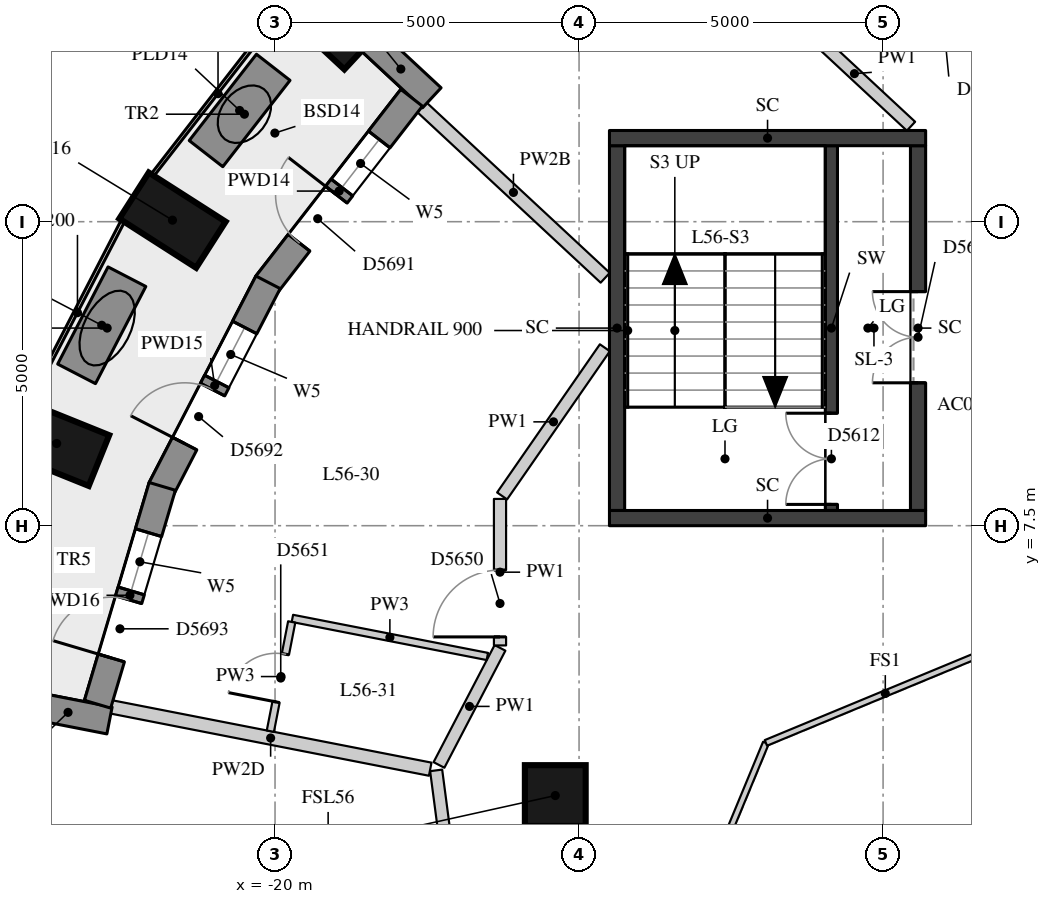
"""IFC4 building model, lengths in metres.
Left out: names, types, materials, properties, quantities, classifications, styles, units other than length and angle.
Written with IfcOpenShell. Run it as: python <this file> out.ifc"""

import sys

from ifc_helpers import new_model, si_unit, direction, frame, frame_2d, origin, origin_2d, place, context, subcontext, project, spatial, rectangle, extrude, element, fill, save


model = new_model("IFC4")
c1 = context("Model", 3, precision=1e-05, world=origin(), true_north=direction((0.0, 1.0)))
c2 = subcontext(c1, "Body", "Model", "MODEL_VIEW")
j1 = project(units=[si_unit("LENGTHUNIT", "METRE"), si_unit("PLANEANGLEUNIT", "RADIAN")], contexts=[c1])
p1 = place(None, origin())
s1 = spatial("IfcSite", under=j1, at=p1, CompositionType="ELEMENT")
p2 = place(p1, origin())
s2 = spatial("IfcBuilding", under=s1, at=p2, CompositionType="ELEMENT")
p3 = place(p2, frame((0.0, 0.0, 199.1)))
s3 = spatial("IfcBuildingStorey", under=s2, at=p3, CompositionType="ELEMENT", Elevation=199.1)
for number, where, z_axis, x_axis in (
    (1, (-19.102, 15.845, 0.0), (0.0, 0.0, 1.0), (-0.732, 0.681, 0.0)),
    (2, (-21.687, 12.525, 0.0), (0.0, 0.0, 1.0), (-0.842, 0.539, 0.0)),
    (3, (-23.591, 8.852, 0.0), (0.0, 0.0, 1.0), (-0.927, 0.374, 0.0)),
):
    element("IfcColumn", number, at=place(p3, frame(where, z_axis=z_axis, x_axis=x_axis)), inside=s3, PredefinedType="COLUMN", context=c2, shape_type="SweptSolid", body=[
        extrude(rectangle(XDim=1.5, YDim=0.9, at=origin_2d()), origin(), (0.0, 0.0, 1.0), 3.3),
    ])
p4 = place(p3, frame((-15.391, 3.062, 0.0), z_axis=(0.0, 0.0, 1.0), x_axis=(1.0, 0.0, 0.0)))
e4 = element("IfcColumn", 4, at=p4, inside=s3, PredefinedType="COLUMN", context=c2, shape_type="SweptSolid", body=[
    extrude(rectangle(XDim=1.0, YDim=1.0, at=origin_2d()), origin(), (0.0, 0.0, 1.0), 3.3),
])
p5 = place(p3, frame((-18.44, 15.484, 0.0), z_axis=(0.0, 0.0, 1.0), x_axis=(0.732268156969, -0.681016406769, 0.0)))
e5 = element("IfcWall", 5, at=p5, inside=s3, PredefinedType="SOLIDWALL", context=c2, shape_type="SweptSolid", body=[
    extrude(rectangle(XDim=1.391, YDim=0.45, at=frame_2d((0.695, 0.0))), origin(), (0.0, 0.0, 1.0), 2.57),
])
p6 = place(p3, frame((-24.087, 4.563, 0.0), z_axis=(0.0, 0.0, 1.0), x_axis=(0.98143579878, -0.191790961394, 0.0)))
e6 = element("IfcWall", 6, at=p6, inside=s3, PredefinedType="SOLIDWALL", context=c2, shape_type="SweptSolid", body=[
    extrude(rectangle(XDim=1.39, YDim=0.45, at=frame_2d((0.695, 0.0))), origin(), (0.0, 0.0, 1.0), 2.47),
])
p7 = place(p3, frame((-17.754, 14.539, 0.0), z_axis=(0.0, 0.0, 1.0), x_axis=(-0.613174901215, -0.789947175779, 0.0)))
e7 = element("IfcWall", 7, at=p7, inside=s3, PredefinedType="SOLIDWALL", context=c2, shape_type="SweptSolid", body=[
    extrude(rectangle(XDim=3.886, YDim=0.45, at=frame_2d((1.943, 0.0))), origin(), (0.0, 0.0, 1.0), 3.02),
])
p8 = place(p7, frame((0.868, 0.0, 0.4)))
e8 = element("IfcOpeningElement", 8, at=p8, cuts=e7, PredefinedType="OPENING", context=c2, shape_type="SweptSolid", body=[
    extrude(rectangle(XDim=1.0, YDim=1.75, at=frame_2d((0.5, 0.875))), frame((0.0, 0.235, 0.0), z_axis=(0.0, -1.0, 0.0), x_axis=(1.0, 0.0, 0.0)), (0.0, 0.0, 1.0), 0.47),
])
p9 = place(p7, frame((2.018, 0.0, 0.0)))
e9 = element("IfcOpeningElement", 9, at=p9, cuts=e7, PredefinedType="OPENING", context=c2, shape_type="SweptSolid", body=[
    extrude(rectangle(XDim=1.0, YDim=2.15, at=frame_2d((0.5, 1.075))), frame((0.0, 0.235, 0.0), z_axis=(0.0, -1.0, 0.0), x_axis=(1.0, 0.0, 0.0)), (0.0, 0.0, 1.0), 0.47),
])
p10 = place(p3, frame((-20.115, 11.503, 0.0), z_axis=(0.0, 0.0, 1.0), x_axis=(-0.459205720451, -0.888329953511, 0.0)))
e10 = element("IfcWall", 10, at=p10, inside=s3, PredefinedType="SOLIDWALL", context=c2, shape_type="SweptSolid", body=[
    extrude(rectangle(XDim=3.823, YDim=0.45, at=frame_2d((1.911, 0.0))), origin(), (0.0, 0.0, 1.0), 3.02),
])
p11 = place(p10, frame((0.836, 0.0, 0.4)))
e11 = element("IfcOpeningElement", 11, at=p11, cuts=e10, PredefinedType="OPENING", context=c2, shape_type="SweptSolid", body=[
    extrude(rectangle(XDim=1.0, YDim=1.75, at=frame_2d((0.5, 0.875))), frame((0.0, 0.235, 0.0), z_axis=(0.0, -1.0, 0.0), x_axis=(1.0, 0.0, 0.0)), (0.0, 0.0, 1.0), 0.47),
])
p12 = place(p10, frame((1.986, 0.0, 0.0)))
e12 = element("IfcOpeningElement", 12, at=p12, cuts=e10, PredefinedType="OPENING", context=c2, shape_type="SweptSolid", body=[
    extrude(rectangle(XDim=1.0, YDim=2.15, at=frame_2d((0.5, 1.075))), frame((0.0, 0.235, 0.0), z_axis=(0.0, -1.0, 0.0), x_axis=(1.0, 0.0, 0.0)), (0.0, 0.0, 1.0), 0.47),
])
p13 = place(p3, frame((-21.854, 8.146, 0.0), z_axis=(0.0, 0.0, 1.0), x_axis=(-0.284757753004, -0.958599510799, 0.0)))
e13 = element("IfcWall", 13, at=p13, inside=s3, PredefinedType="SOLIDWALL", context=c2, shape_type="SweptSolid", body=[
    extrude(rectangle(XDim=3.737, YDim=0.45, at=frame_2d((1.869, 0.0))), origin(), (0.0, 0.0, 1.0), 3.02),
])
p14 = place(p13, frame((0.794, 0.0, 0.4)))
e14 = element("IfcOpeningElement", 14, at=p14, cuts=e13, PredefinedType="OPENING", context=c2, shape_type="SweptSolid", body=[
    extrude(rectangle(XDim=1.0, YDim=1.75, at=frame_2d((0.5, 0.875))), frame((0.0, 0.235, 0.0), z_axis=(0.0, -1.0, 0.0), x_axis=(1.0, 0.0, 0.0)), (0.0, 0.0, 1.0), 0.47),
])
p15 = place(p13, frame((1.944, 0.0, 0.0)))
e15 = element("IfcOpeningElement", 15, at=p15, cuts=e13, PredefinedType="OPENING", context=c2, shape_type="SweptSolid", body=[
    extrude(rectangle(XDim=1.0, YDim=2.15, at=frame_2d((0.5, 1.075))), frame((0.0, 0.235, 0.0), z_axis=(0.0, -1.0, 0.0), x_axis=(1.0, 0.0, 0.0)), (0.0, 0.0, 1.0), 0.47),
])
for number, where, z_axis, x_axis in (
    (16, (-20.03, 15.04, 0.0), (0.0, 0.0, 1.0), (-0.614, -0.789, 0.0)),
    (17, (-22.436, 11.595, 0.0), (0.0, 0.0, 1.0), (-0.46, -0.888, 0.0)),
):
    element("IfcWall", number, at=place(p3, frame(where, z_axis=z_axis, x_axis=x_axis)), inside=s3, PredefinedType="USERDEFINED", context=c2, shape_type="SweptSolid", body=[
        extrude(rectangle(XDim=1.8, YDim=0.7, at=frame_2d((0.9, 0.0))), origin(), (0.0, 0.0, 1.0), 0.75),
    ])
p16 = place(p3, frame((-10.85, 7.75, 0.0), z_axis=(0.0, 0.0, 1.0), x_axis=(0.0, 1.0, 0.0)))
e18 = element("IfcWall", 18, at=p16, inside=s3, PredefinedType="SHEAR", context=c2, shape_type="SweptSolid", body=[
    extrude(rectangle(XDim=6.0, YDim=0.2, at=frame_2d((3.0, 0.0))), origin(), (0.0, 0.0, 1.0), 3.02),
])
p17 = place(p16, frame((0.1, 0.0, 0.0)))
e19 = element("IfcOpeningElement", 19, at=p17, cuts=e18, PredefinedType="OPENING", context=c2, shape_type="SweptSolid", body=[
    extrude(rectangle(XDim=1.5, YDim=2.1, at=frame_2d((0.75, 1.05))), frame((0.0, 0.11, 0.0), z_axis=(0.0, -1.0, 0.0), x_axis=(1.0, 0.0, 0.0)), (0.0, 0.0, 1.0), 0.22),
])
p18 = place(p3, frame((-14.375, 7.75, -0.28), z_axis=(0.0, 0.0, 1.0), x_axis=(0.0, 1.0, 0.0)))
e20 = element("IfcWall", 20, at=p18, inside=s3, PredefinedType="SHEAR", context=c2, shape_type="SweptSolid", body=[
    extrude(rectangle(XDim=6.0, YDim=0.25, at=frame_2d((3.0, 0.0))), origin(), (0.0, 0.0, 1.0), 3.3),
])
p19 = place(p3, frame((-9.425, 7.75, -0.28), z_axis=(0.0, 0.0, 1.0), x_axis=(0.0, 1.0, 0.0)))
e21 = element("IfcWall", 21, at=p19, inside=s3, PredefinedType="SHEAR", context=c2, shape_type="SweptSolid", body=[
    extrude(rectangle(XDim=6.0, YDim=0.25, at=frame_2d((3.0, 0.0))), origin(), (0.0, 0.0, 1.0), 3.3),
])
p20 = place(p19, frame((2.1, 0.0, 0.28)))
e22 = element("IfcOpeningElement", 22, at=p20, cuts=e21, PredefinedType="OPENING", context=c2, shape_type="SweptSolid", body=[
    extrude(rectangle(XDim=1.5, YDim=2.1, at=frame_2d((0.75, 1.05))), frame((0.0, 0.135, 0.0), z_axis=(0.0, -1.0, 0.0), x_axis=(1.0, 0.0, 0.0)), (0.0, 0.0, 1.0), 0.27),
])
for number, where, z_axis, x_axis in (
    (23, (-14.5, 13.875, -0.28), (0.0, 0.0, 1.0), (1.0, 0.0, 0.0)),
    (24, (-14.5, 7.625, -0.28), (0.0, 0.0, 1.0), (1.0, 0.0, 0.0)),
):
    element("IfcWall", number, at=place(p3, frame(where, z_axis=z_axis, x_axis=x_axis)), inside=s3, PredefinedType="SHEAR", context=c2, shape_type="SweptSolid", body=[
        extrude(rectangle(XDim=5.2, YDim=0.25, at=frame_2d((2.6, 0.0))), origin(), (0.0, 0.0, 1.0), 3.3),
    ])
p21 = place(p3, frame((-16.303, -4.501, 0.0), z_axis=(0.0, 0.0, 1.0), x_axis=(-0.130191522351, 0.991488864036, 0.0)))
e25 = element("IfcWall", 25, at=p21, inside=s3, PredefinedType="PARTITIONING", context=c2, shape_type="SweptSolid", body=[
    extrude(rectangle(XDim=8.045, YDim=0.2, at=frame_2d((4.022, 0.0))), origin(), (0.0, 0.0, 1.0), 3.02),
])
p22 = place(p21, frame((2.738, 0.0, 0.0)))
e26 = element("IfcOpeningElement", 26, at=p22, cuts=e25, PredefinedType="OPENING", context=c2, shape_type="SweptSolid", body=[
    extrude(rectangle(XDim=0.9, YDim=2.1, at=frame_2d((0.45, 1.05))), frame((0.0, 0.11, 0.0), z_axis=(0.0, -1.0, 0.0), x_axis=(1.0, 0.0, 0.0)), (0.0, 0.0, 1.0), 0.22),
])
p23 = place(p3, frame((-17.304, 3.565, 0.0), z_axis=(0.0, 0.0, 1.0), x_axis=(0.46212415324, 0.886815238363, 0.0)))
e27 = element("IfcWall", 27, at=p23, inside=s3, PredefinedType="PARTITIONING", context=c2, shape_type="SweptSolid", body=[
    extrude(rectangle(XDim=2.172, YDim=0.2, at=frame_2d((1.086, 0.0))), origin(), (0.0, 0.0, 1.0), 3.02),
])
p24 = place(p3, frame((-16.3, 5.531, 0.0), z_axis=(0.0, 0.0, 1.0), x_axis=(0.0, 1.0, 0.0)))
e28 = element("IfcWall", 28, at=p24, inside=s3, PredefinedType="PARTITIONING", context=c2, shape_type="SweptSolid", body=[
    extrude(rectangle(XDim=2.409, YDim=0.2, at=frame_2d((1.205, 0.0))), origin(), (0.0, 0.0, 1.0), 3.02),
])
p25 = place(p24, frame((0.14, 0.0, 0.0)))
e29 = element("IfcOpeningElement", 29, at=p25, cuts=e28, PredefinedType="OPENING", context=c2, shape_type="SweptSolid", body=[
    extrude(rectangle(XDim=1.1, YDim=2.1, at=frame_2d((0.55, 1.05))), frame((0.0, 0.11, 0.0), z_axis=(0.0, -1.0, 0.0), x_axis=(1.0, 0.0, 0.0)), (0.0, 0.0, 1.0), 0.22),
])
p26 = place(p3, frame((-16.266, 7.989, 0.0), z_axis=(0.0, 0.0, 1.0), x_axis=(0.569860411146, 0.821741511552, 0.0)))
e30 = element("IfcWall", 30, at=p26, inside=s3, PredefinedType="PARTITIONING", context=c2, shape_type="SweptSolid", body=[
    extrude(rectangle(XDim=2.966, YDim=0.2, at=frame_2d((1.483, 0.0))), origin(), (0.0, 0.0, 1.0), 3.02),
])
p27 = place(p3, frame((-9.541, 14.07, 0.0), z_axis=(0.0, 0.0, 1.0), x_axis=(-0.732300412469, 0.680981722146, 0.0)))
e31 = element("IfcWall", 31, at=p27, inside=s3, PredefinedType="PARTITIONING", context=c2, shape_type="SweptSolid", body=[
    extrude(rectangle(XDim=2.541, YDim=0.2, at=frame_2d((1.27, 0.0))), origin(), (0.0, 0.0, 1.0), 3.02),
])
p28 = place(p3, frame((-17.588, 14.385, 0.0), z_axis=(0.0, 0.0, 1.0), x_axis=(0.732259547802, -0.681025663725, 0.0)))
e32 = element("IfcWall", 32, at=p28, inside=s3, PredefinedType="PARTITIONING", context=c2, shape_type="SweptSolid", body=[
    extrude(rectangle(XDim=4.122, YDim=0.22, at=frame_2d((2.061, 0.0))), origin(), (0.0, 0.0, 1.0), 2.57),
])
p29 = place(p3, frame((-22.697, 4.521, 0.0), z_axis=(0.0, 0.0, 1.0), x_axis=(0.981448712972, -0.19172486486, 0.0)))
e33 = element("IfcWall", 33, at=p29, inside=s3, PredefinedType="PARTITIONING", context=c2, shape_type="SweptSolid", body=[
    extrude(rectangle(XDim=5.348, YDim=0.22, at=frame_2d((2.674, 0.0))), origin(), (0.0, 0.0, 1.0), 2.47),
])
p30 = place(p3, frame((-16.508, 5.349, 0.0), z_axis=(0.0, 0.0, 1.0), x_axis=(-0.981441910277, 0.191759684898, 0.0)))
e34 = element("IfcWall", 34, at=p30, inside=s3, PredefinedType="PARTITIONING", context=c2, shape_type="SweptSolid", body=[
    extrude(rectangle(XDim=3.267, YDim=0.12, at=frame_2d((1.633, 0.0))), origin(), (0.0, 0.0, 1.0), 3.02),
])
p31 = place(p3, frame((-19.726, 5.917, 0.0), z_axis=(0.0, 0.0, 1.0), x_axis=(-0.191830051998, -0.981428158935, 0.0)))
e35 = element("IfcWall", 35, at=p31, inside=s3, PredefinedType="PARTITIONING", context=c2, shape_type="SweptSolid", body=[
    extrude(rectangle(XDim=1.83, YDim=0.12, at=frame_2d((0.915, 0.0))), origin(), (0.0, 0.0, 1.0), 3.02),
])
p32 = place(p31, frame((0.54, 0.0, 0.0)))
e36 = element("IfcOpeningElement", 36, at=p32, cuts=e35, PredefinedType="OPENING", context=c2, shape_type="SweptSolid", body=[
    extrude(rectangle(XDim=0.8, YDim=2.1, at=frame_2d((0.4, 1.05))), frame((0.0, 0.07, 0.0), z_axis=(0.0, -1.0, 0.0), x_axis=(1.0, 0.0, 0.0)), (0.0, 0.0, 1.0), 0.14),
])
for number, where, z_axis, x_axis in (
    (37, (-13.554, 0.0, 0.0), (0.0, 0.0, 1.0), (0.383, 0.924, 0.0)),
    (38, (-11.927, 3.927, 0.0), (0.0, 0.0, 1.0), (0.924, 0.383, 0.0)),
):
    element("IfcWall", number, at=place(p3, frame(where, z_axis=z_axis, x_axis=x_axis)), inside=s3, PredefinedType="PARTITIONING", context=c2, shape_type="SweptSolid", body=[
        extrude(rectangle(XDim=4.251, YDim=0.1, at=frame_2d((2.125, 0.0))), origin(), (0.0, 0.0, 1.0), 3.02),
    ])
p33 = place(p8, origin())
e39 = element("IfcWindow", 39, at=p33, inside=s3, PartitioningType="SINGLE_PANEL", PredefinedType="WINDOW", context=c2, shape_type="SweptSolid", body=[
    extrude(rectangle(XDim=1.0, YDim=1.75, at=frame_2d((0.5, 0.875))), frame((0.0, 0.035, 0.0), z_axis=(0.0, -1.0, 0.0), x_axis=(1.0, 0.0, 0.0)), (0.0, 0.0, 1.0), 0.06),
])
fill(e8, e39)
p34 = place(p9, frame((1.0, 0.0, 0.0), z_axis=(0.0, 0.0, 1.0), x_axis=(-1.0, 0.0, 0.0)))
e40 = element("IfcDoor", 40, at=p34, inside=s3, OperationType="SINGLE_SWING_RIGHT", PredefinedType="DOOR", context=c2, shape_type="SweptSolid", body=[
    extrude(rectangle(XDim=1.0, YDim=2.15, at=frame_2d((0.5, 1.075))), frame((0.0, 0.075, 0.0), z_axis=(0.0, -1.0, 0.0), x_axis=(1.0, 0.0, 0.0)), (0.0, 0.0, 1.0), 0.05),
])
fill(e9, e40)
p35 = place(p11, origin())
e41 = element("IfcWindow", 41, at=p35, inside=s3, PartitioningType="SINGLE_PANEL", PredefinedType="WINDOW", context=c2, shape_type="SweptSolid", body=[
    extrude(rectangle(XDim=1.0, YDim=1.75, at=frame_2d((0.5, 0.875))), frame((0.0, 0.035, 0.0), z_axis=(0.0, -1.0, 0.0), x_axis=(1.0, 0.0, 0.0)), (0.0, 0.0, 1.0), 0.06),
])
fill(e11, e41)
p36 = place(p12, frame((1.0, 0.0, 0.0), z_axis=(0.0, 0.0, 1.0), x_axis=(-1.0, 0.0, 0.0)))
e42 = element("IfcDoor", 42, at=p36, inside=s3, OperationType="SINGLE_SWING_LEFT", PredefinedType="DOOR", context=c2, shape_type="SweptSolid", body=[
    extrude(rectangle(XDim=1.0, YDim=2.15, at=frame_2d((0.5, 1.075))), frame((0.0, 0.075, 0.0), z_axis=(0.0, -1.0, 0.0), x_axis=(1.0, 0.0, 0.0)), (0.0, 0.0, 1.0), 0.05),
])
fill(e12, e42)
p37 = place(p14, origin())
e43 = element("IfcWindow", 43, at=p37, inside=s3, PartitioningType="SINGLE_PANEL", PredefinedType="WINDOW", context=c2, shape_type="SweptSolid", body=[
    extrude(rectangle(XDim=1.0, YDim=1.75, at=frame_2d((0.5, 0.875))), frame((0.0, 0.035, 0.0), z_axis=(0.0, -1.0, 0.0), x_axis=(1.0, 0.0, 0.0)), (0.0, 0.0, 1.0), 0.06),
])
fill(e14, e43)
p38 = place(p15, frame((1.0, 0.0, 0.0), z_axis=(0.0, 0.0, 1.0), x_axis=(-1.0, 0.0, 0.0)))
e44 = element("IfcDoor", 44, at=p38, inside=s3, OperationType="SINGLE_SWING_LEFT", PredefinedType="DOOR", context=c2, shape_type="SweptSolid", body=[
    extrude(rectangle(XDim=1.0, YDim=2.15, at=frame_2d((0.5, 1.075))), frame((0.0, 0.075, 0.0), z_axis=(0.0, -1.0, 0.0), x_axis=(1.0, 0.0, 0.0)), (0.0, 0.0, 1.0), 0.05),
])
fill(e15, e44)
p39 = place(p17, origin())
e45 = element("IfcDoor", 45, at=p39, inside=s3, OperationType="DOUBLE_DOOR_SINGLE_SWING", PredefinedType="DOOR", context=c2, shape_type="SweptSolid", body=[
    extrude(rectangle(XDim=1.5, YDim=2.1, at=frame_2d((0.75, 1.05))), frame((0.0, 0.025, 0.0), z_axis=(0.0, -1.0, 0.0), x_axis=(1.0, 0.0, 0.0)), (0.0, 0.0, 1.0), 0.05),
])
fill(e19, e45)
p40 = place(p20, origin())
e46 = element("IfcDoor", 46, at=p40, inside=s3, OperationType="DOUBLE_DOOR_SINGLE_SWING", PredefinedType="DOOR", context=c2, shape_type="SweptSolid", body=[
    extrude(rectangle(XDim=1.5, YDim=2.1, at=frame_2d((0.75, 1.05))), frame((0.0, 0.025, 0.0), z_axis=(0.0, -1.0, 0.0), x_axis=(1.0, 0.0, 0.0)), (0.0, 0.0, 1.0), 0.05),
])
fill(e22, e46)
p41 = place(p25, origin())
e47 = element("IfcDoor", 47, at=p41, inside=s3, OperationType="SINGLE_SWING_LEFT", PredefinedType="DOOR", context=c2, shape_type="SweptSolid", body=[
    extrude(rectangle(XDim=1.1, YDim=2.1, at=frame_2d((0.55, 1.05))), frame((0.0, 0.025, 0.0), z_axis=(0.0, -1.0, 0.0), x_axis=(1.0, 0.0, 0.0)), (0.0, 0.0, 1.0), 0.05),
])
fill(e29, e47)
p42 = place(p32, origin())
e48 = element("IfcDoor", 48, at=p42, inside=s3, OperationType="SINGLE_SWING_LEFT", PredefinedType="DOOR", context=c2, shape_type="SweptSolid", body=[
    extrude(rectangle(XDim=0.8, YDim=2.1, at=frame_2d((0.4, 1.05))), frame((0.0, 0.025, 0.0), z_axis=(0.0, -1.0, 0.0), x_axis=(1.0, 0.0, 0.0)), (0.0, 0.0, 1.0), 0.05),
])
fill(e36, e48)
save(model, sys.argv[1])
